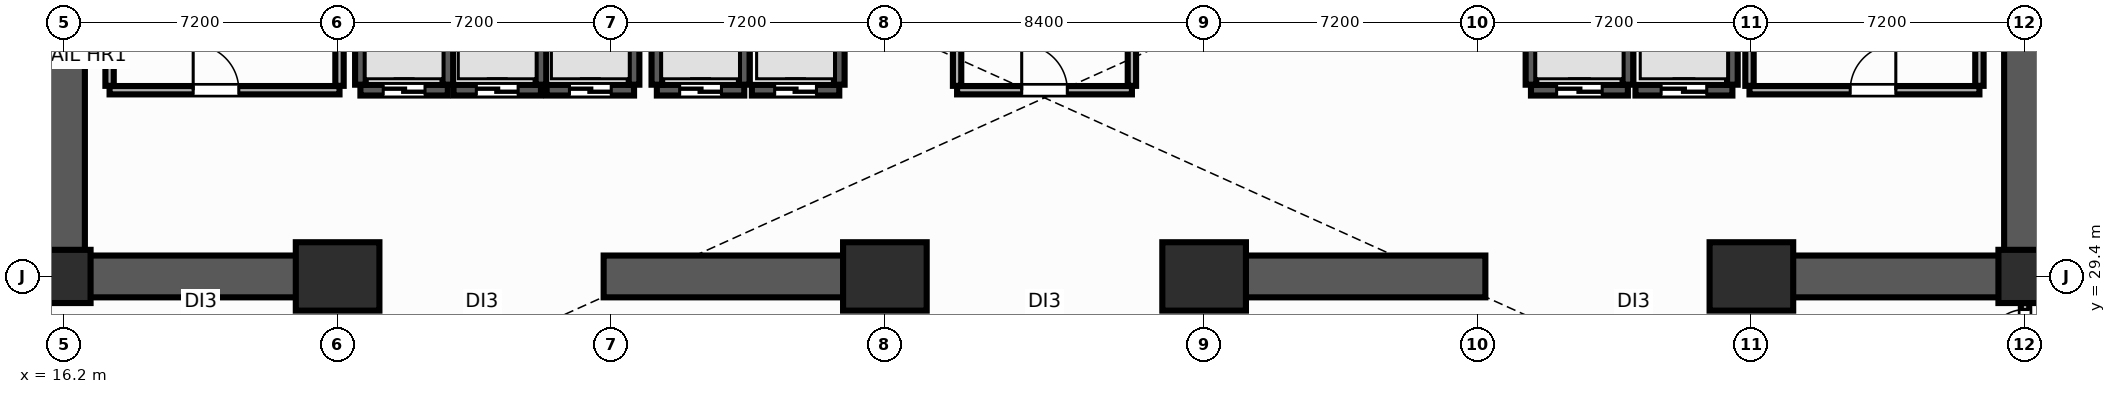
"""IFC4 building model, lengths in metres.
Left out: names, types, materials, properties, quantities, classifications, styles, units other than length and angle.
Written with IfcOpenShell. Run it as: python <this file> out.ifc"""

import sys

from ifc_helpers import new_model, si_unit, direction, frame, frame_2d, origin, origin_2d, place, context, subcontext, project, spatial, rectangle, extrude, element, fill, save


model = new_model("IFC4")
c1 = context("Model", 3, precision=1e-05, world=origin(), true_north=direction((0.0, 1.0)))
c2 = subcontext(c1, "Body", "Model", "MODEL_VIEW")
j1 = project(units=[si_unit("LENGTHUNIT", "METRE"), si_unit("PLANEANGLEUNIT", "RADIAN")], contexts=[c1])
p1 = place(None, origin())
s1 = spatial("IfcSite", under=j1, at=p1, CompositionType="ELEMENT")
p2 = place(p1, origin())
s2 = spatial("IfcBuilding", under=s1, at=p2, CompositionType="ELEMENT")
p3 = place(p2, origin())
s3 = spatial("IfcBuildingStorey", under=s2, at=p3, CompositionType="ELEMENT", Elevation=0.0)
for number, where, z_axis, x_axis in (
    (1, (23.4, 29.4, 0.0), (0.0, 0.0, 1.0), (1.0, 0.0, 0.0)),
    (2, (37.8, 29.4, 0.0), (0.0, 0.0, 1.0), (1.0, 0.0, 0.0)),
    (3, (46.2, 29.4, 0.0), (0.0, 0.0, 1.0), (1.0, 0.0, 0.0)),
    (4, (60.6, 29.4, 0.0), (0.0, 0.0, 1.0), (1.0, 0.0, 0.0)),
):
    element("IfcColumn", number, at=place(p3, frame(where, z_axis=z_axis, x_axis=x_axis)), inside=s3, PredefinedType="USERDEFINED", context=c2, shape_type="SweptSolid", body=[
        extrude(rectangle(XDim=2.2, YDim=1.8, at=origin_2d()), origin(), (0.0, 0.0, 1.0), 7.68),
    ])
for number, where, z_axis, x_axis in (
    (5, (16.2, 29.4, 0.0), (0.0, 0.0, 1.0), (1.0, 0.0, 0.0)),
    (6, (67.8, 29.4, 0.0), (0.0, 0.0, 1.0), (1.0, 0.0, 0.0)),
):
    element("IfcColumn", number, at=place(p3, frame(where, z_axis=z_axis, x_axis=x_axis)), inside=s3, PredefinedType="COLUMN", context=c2, shape_type="SweptSolid", body=[
        extrude(rectangle(XDim=1.4, YDim=1.4, at=origin_2d()), origin(), (0.0, 0.0, 1.0), 7.68),
    ])
for number, where, z_axis, x_axis in (
    (7, (16.2, 29.4, 0.0), (0.0, 0.0, 1.0), (0.0, 1.0, 0.0)),
    (8, (67.8, 29.4, 0.0), (0.0, 0.0, 1.0), (0.0, 1.0, 0.0)),
):
    element("IfcWall", number, at=place(p3, frame(where, z_axis=z_axis, x_axis=x_axis)), inside=s3, PredefinedType="SHEAR", context=c2, shape_type="SweptSolid", body=[
        extrude(rectangle(XDim=19.2, YDim=1.1, at=frame_2d((9.6, 0.0))), origin(), (0.0, 0.0, 1.0), 7.68),
    ])
p4 = place(p3, frame((16.755, 29.4, 0.0), z_axis=(0.0, 0.0, 1.0), x_axis=(1.0, 0.0, 0.0)))
e9 = element("IfcWall", 9, at=p4, inside=s3, PredefinedType="SHEAR", context=c2, shape_type="SweptSolid", body=[
    extrude(rectangle(XDim=6.845, YDim=1.1, at=frame_2d((3.423, 0.0))), origin(), (0.0, 0.0, 1.0), 7.68),
])
for number, where, z_axis, x_axis in (
    (10, (30.4, 29.4, 0.0), (0.0, 0.0, 1.0), (1.0, 0.0, 0.0)),
    (11, (46.0, 29.4, 0.0), (0.0, 0.0, 1.0), (1.0, 0.0, 0.0)),
):
    element("IfcWall", number, at=place(p3, frame(where, z_axis=z_axis, x_axis=x_axis)), inside=s3, PredefinedType="SHEAR", context=c2, shape_type="SweptSolid", body=[
        extrude(rectangle(XDim=7.6, YDim=1.1, at=frame_2d((3.8, 0.0))), origin(), (0.0, 0.0, 1.0), 7.68),
    ])
p5 = place(p3, frame((60.4, 29.4, 0.0), z_axis=(0.0, 0.0, 1.0), x_axis=(1.0, 0.0, 0.0)))
e12 = element("IfcWall", 12, at=p5, inside=s3, PredefinedType="SHEAR", context=c2, shape_type="SweptSolid", body=[
    extrude(rectangle(XDim=6.845, YDim=1.1, at=frame_2d((3.423, 0.0))), origin(), (0.0, 0.0, 1.0), 7.68),
])
p6 = place(p3, frame((24.0, 34.3, 0.0), z_axis=(0.0, 0.0, 1.0), x_axis=(1.0, 0.0, 0.0)))
e13 = element("IfcWall", 13, at=p6, inside=s3, PredefinedType="SHEAR", context=c2, shape_type="SweptSolid", body=[
    extrude(rectangle(XDim=2.3, YDim=0.28, at=frame_2d((1.15, 0.0))), origin(), (0.0, 0.0, 1.0), 7.68),
])
p7 = place(p6, frame((0.6, 0.0, 0.0)))
e14 = element("IfcOpeningElement", 14, at=p7, cuts=e13, PredefinedType="OPENING", context=c2, shape_type="SweptSolid", body=[
    extrude(rectangle(XDim=1.1, YDim=2.2, at=frame_2d((0.55, 1.1))), frame((0.0, 0.15, 0.0), z_axis=(0.0, -1.0, 0.0), x_axis=(1.0, 0.0, 0.0)), (0.0, 0.0, 1.0), 0.3),
])
for number, where, z_axis, x_axis in (
    (15, (24.0, 34.445, 0.0), (0.0, 0.0, 1.0), (0.0, 1.0, 0.0)),
    (16, (26.3, 34.445, 0.0), (0.0, 0.0, 1.0), (0.0, 1.0, 0.0)),
):
    element("IfcWall", number, at=place(p3, frame(where, z_axis=z_axis, x_axis=x_axis)), inside=s3, PredefinedType="SHEAR", context=c2, shape_type="SweptSolid", body=[
        extrude(rectangle(XDim=2.01, YDim=0.28, at=frame_2d((1.005, 0.0))), origin(), (0.0, 0.0, 1.0), 7.68),
    ])
p8 = place(p3, frame((26.45, 34.3, 0.0), z_axis=(0.0, 0.0, 1.0), x_axis=(1.0, 0.0, 0.0)))
e17 = element("IfcWall", 17, at=p8, inside=s3, PredefinedType="SHEAR", context=c2, shape_type="SweptSolid", body=[
    extrude(rectangle(XDim=2.3, YDim=0.28, at=frame_2d((1.15, 0.0))), origin(), (0.0, 0.0, 1.0), 7.68),
])
p9 = place(p8, frame((0.6, 0.0, 0.0)))
e18 = element("IfcOpeningElement", 18, at=p9, cuts=e17, PredefinedType="OPENING", context=c2, shape_type="SweptSolid", body=[
    extrude(rectangle(XDim=1.1, YDim=2.2, at=frame_2d((0.55, 1.1))), frame((0.0, 0.15, 0.0), z_axis=(0.0, -1.0, 0.0), x_axis=(1.0, 0.0, 0.0)), (0.0, 0.0, 1.0), 0.3),
])
p10 = place(p3, frame((28.75, 34.445, 0.0), z_axis=(0.0, 0.0, 1.0), x_axis=(0.0, 1.0, 0.0)))
e19 = element("IfcWall", 19, at=p10, inside=s3, PredefinedType="SHEAR", context=c2, shape_type="SweptSolid", body=[
    extrude(rectangle(XDim=2.01, YDim=0.28, at=frame_2d((1.005, 0.0))), origin(), (0.0, 0.0, 1.0), 7.68),
])
p11 = place(p3, frame((28.9, 34.3, 0.0), z_axis=(0.0, 0.0, 1.0), x_axis=(1.0, 0.0, 0.0)))
e20 = element("IfcWall", 20, at=p11, inside=s3, PredefinedType="SHEAR", context=c2, shape_type="SweptSolid", body=[
    extrude(rectangle(XDim=2.3, YDim=0.28, at=frame_2d((1.15, 0.0))), origin(), (0.0, 0.0, 1.0), 7.68),
])
p12 = place(p11, frame((0.6, 0.0, 0.0)))
e21 = element("IfcOpeningElement", 21, at=p12, cuts=e20, PredefinedType="OPENING", context=c2, shape_type="SweptSolid", body=[
    extrude(rectangle(XDim=1.1, YDim=2.2, at=frame_2d((0.55, 1.1))), frame((0.0, 0.15, 0.0), z_axis=(0.0, -1.0, 0.0), x_axis=(1.0, 0.0, 0.0)), (0.0, 0.0, 1.0), 0.3),
])
p13 = place(p3, frame((31.2, 34.445, 0.0), z_axis=(0.0, 0.0, 1.0), x_axis=(0.0, 1.0, 0.0)))
e22 = element("IfcWall", 22, at=p13, inside=s3, PredefinedType="SHEAR", context=c2, shape_type="SweptSolid", body=[
    extrude(rectangle(XDim=2.01, YDim=0.28, at=frame_2d((1.005, 0.0))), origin(), (0.0, 0.0, 1.0), 7.68),
])
p14 = place(p3, frame((54.8, 34.3, 0.0), z_axis=(0.0, 0.0, 1.0), x_axis=(1.0, 0.0, 0.0)))
e23 = element("IfcWall", 23, at=p14, inside=s3, PredefinedType="SHEAR", context=c2, shape_type="SweptSolid", body=[
    extrude(rectangle(XDim=2.55, YDim=0.28, at=frame_2d((1.275, 0.0))), origin(), (0.0, 0.0, 1.0), 7.68),
])
p15 = place(p14, frame((0.675, 0.0, 0.0)))
e24 = element("IfcOpeningElement", 24, at=p15, cuts=e23, PredefinedType="OPENING", context=c2, shape_type="SweptSolid", body=[
    extrude(rectangle(XDim=1.2, YDim=2.25, at=frame_2d((0.6, 1.125))), frame((0.0, 0.15, 0.0), z_axis=(0.0, -1.0, 0.0), x_axis=(1.0, 0.0, 0.0)), (0.0, 0.0, 1.0), 0.3),
])
for number, where, z_axis, x_axis in (
    (25, (54.8, 34.445, 0.0), (0.0, 0.0, 1.0), (0.0, 1.0, 0.0)),
    (26, (57.35, 34.445, 0.0), (0.0, 0.0, 1.0), (0.0, 1.0, 0.0)),
):
    element("IfcWall", number, at=place(p3, frame(where, z_axis=z_axis, x_axis=x_axis)), inside=s3, PredefinedType="SHEAR", context=c2, shape_type="SweptSolid", body=[
        extrude(rectangle(XDim=2.11, YDim=0.28, at=frame_2d((1.055, 0.0))), origin(), (0.0, 0.0, 1.0), 7.68),
    ])
p16 = place(p3, frame((57.55, 34.3, 0.0), z_axis=(0.0, 0.0, 1.0), x_axis=(1.0, 0.0, 0.0)))
e27 = element("IfcWall", 27, at=p16, inside=s3, PredefinedType="SHEAR", context=c2, shape_type="SweptSolid", body=[
    extrude(rectangle(XDim=2.55, YDim=0.28, at=frame_2d((1.275, 0.0))), origin(), (0.0, 0.0, 1.0), 7.68),
])
p17 = place(p16, frame((0.675, 0.0, 0.0)))
e28 = element("IfcOpeningElement", 28, at=p17, cuts=e27, PredefinedType="OPENING", context=c2, shape_type="SweptSolid", body=[
    extrude(rectangle(XDim=1.2, YDim=2.25, at=frame_2d((0.6, 1.125))), frame((0.0, 0.15, 0.0), z_axis=(0.0, -1.0, 0.0), x_axis=(1.0, 0.0, 0.0)), (0.0, 0.0, 1.0), 0.3),
])
p18 = place(p3, frame((60.1, 34.445, 0.0), z_axis=(0.0, 0.0, 1.0), x_axis=(0.0, 1.0, 0.0)))
e29 = element("IfcWall", 29, at=p18, inside=s3, PredefinedType="SHEAR", context=c2, shape_type="SweptSolid", body=[
    extrude(rectangle(XDim=2.11, YDim=0.28, at=frame_2d((1.055, 0.0))), origin(), (0.0, 0.0, 1.0), 7.68),
])
p19 = place(p3, frame((31.8, 34.3, 0.0), z_axis=(0.0, 0.0, 1.0), x_axis=(1.0, 0.0, 0.0)))
e30 = element("IfcWall", 30, at=p19, inside=s3, PredefinedType="SHEAR", context=c2, shape_type="SweptSolid", body=[
    extrude(rectangle(XDim=2.3, YDim=0.28, at=frame_2d((1.15, 0.0))), origin(), (0.0, 0.0, 1.0), 7.68),
])
p20 = place(p19, frame((0.6, 0.0, 0.0)))
e31 = element("IfcOpeningElement", 31, at=p20, cuts=e30, PredefinedType="OPENING", context=c2, shape_type="SweptSolid", body=[
    extrude(rectangle(XDim=1.1, YDim=2.2, at=frame_2d((0.55, 1.1))), frame((0.0, 0.15, 0.0), z_axis=(0.0, -1.0, 0.0), x_axis=(1.0, 0.0, 0.0)), (0.0, 0.0, 1.0), 0.3),
])
for number, where, z_axis, x_axis in (
    (32, (31.8, 34.445, 0.0), (0.0, 0.0, 1.0), (0.0, 1.0, 0.0)),
    (33, (34.1, 34.445, 0.0), (0.0, 0.0, 1.0), (0.0, 1.0, 0.0)),
):
    element("IfcWall", number, at=place(p3, frame(where, z_axis=z_axis, x_axis=x_axis)), inside=s3, PredefinedType="SHEAR", context=c2, shape_type="SweptSolid", body=[
        extrude(rectangle(XDim=2.01, YDim=0.28, at=frame_2d((1.005, 0.0))), origin(), (0.0, 0.0, 1.0), 7.68),
    ])
p21 = place(p3, frame((34.3, 34.3, 0.0), z_axis=(0.0, 0.0, 1.0), x_axis=(1.0, 0.0, 0.0)))
e34 = element("IfcWall", 34, at=p21, inside=s3, PredefinedType="SHEAR", context=c2, shape_type="SweptSolid", body=[
    extrude(rectangle(XDim=2.3, YDim=0.28, at=frame_2d((1.15, 0.0))), origin(), (0.0, 0.0, 1.0), 7.68),
])
p22 = place(p21, frame((0.6, 0.0, 0.0)))
e35 = element("IfcOpeningElement", 35, at=p22, cuts=e34, PredefinedType="OPENING", context=c2, shape_type="SweptSolid", body=[
    extrude(rectangle(XDim=1.1, YDim=2.2, at=frame_2d((0.55, 1.1))), frame((0.0, 0.15, 0.0), z_axis=(0.0, -1.0, 0.0), x_axis=(1.0, 0.0, 0.0)), (0.0, 0.0, 1.0), 0.3),
])
p23 = place(p3, frame((36.6, 34.445, 0.0), z_axis=(0.0, 0.0, 1.0), x_axis=(0.0, 1.0, 0.0)))
e36 = element("IfcWall", 36, at=p23, inside=s3, PredefinedType="SHEAR", context=c2, shape_type="SweptSolid", body=[
    extrude(rectangle(XDim=2.01, YDim=0.28, at=frame_2d((1.005, 0.0))), origin(), (0.0, 0.0, 1.0), 7.68),
])
p24 = place(p3, frame((17.4, 34.3, 0.0), z_axis=(0.0, 0.0, 1.0), x_axis=(1.0, 0.0, 0.0)))
e37 = element("IfcWall", 37, at=p24, inside=s3, PredefinedType="PARTITIONING", context=c2, shape_type="SweptSolid", body=[
    extrude(rectangle(XDim=6.05, YDim=0.22, at=frame_2d((3.025, 0.0))), origin(), (0.0, 0.0, 1.0), 7.68),
])
p25 = place(p24, frame((2.2, 0.0, 0.0)))
e38 = element("IfcOpeningElement", 38, at=p25, cuts=e37, PredefinedType="OPENING", context=c2, shape_type="SweptSolid", body=[
    extrude(rectangle(XDim=1.2, YDim=2.15, at=frame_2d((0.6, 1.075))), frame((0.0, 0.12, 0.0), z_axis=(0.0, -1.0, 0.0), x_axis=(1.0, 0.0, 0.0)), (0.0, 0.0, 1.0), 0.24),
])
p26 = place(p3, frame((17.4, 34.415, 0.0), z_axis=(0.0, 0.0, 1.0), x_axis=(0.0, 1.0, 0.0)))
e39 = element("IfcWall", 39, at=p26, inside=s3, PredefinedType="PARTITIONING", context=c2, shape_type="SweptSolid", body=[
    extrude(rectangle(XDim=5.43, YDim=0.22, at=frame_2d((2.715, 0.0))), origin(), (0.0, 0.0, 1.0), 7.68),
])
p27 = place(p3, frame((23.45, 34.415, 0.0), z_axis=(0.0, 0.0, 1.0), x_axis=(0.0, 1.0, 0.0)))
e40 = element("IfcWall", 40, at=p27, inside=s3, PredefinedType="PARTITIONING", context=c2, shape_type="SweptSolid", body=[
    extrude(rectangle(XDim=5.64, YDim=0.22, at=frame_2d((2.82, 0.0))), origin(), (0.0, 0.0, 1.0), 7.68),
])
p28 = place(p27, frame((3.385, 0.0, 0.0)))
e41 = element("IfcOpeningElement", 41, at=p28, cuts=e40, PredefinedType="OPENING", context=c2, shape_type="SweptSolid", body=[
    extrude(rectangle(XDim=1.2, YDim=2.15, at=frame_2d((0.6, 1.075))), frame((0.0, 0.12, 0.0), z_axis=(0.0, -1.0, 0.0), x_axis=(1.0, 0.0, 0.0)), (0.0, 0.0, 1.0), 0.24),
])
p29 = place(p3, frame((60.55, 34.3, 0.0), z_axis=(0.0, 0.0, 1.0), x_axis=(1.0, 0.0, 0.0)))
e42 = element("IfcWall", 42, at=p29, inside=s3, PredefinedType="PARTITIONING", context=c2, shape_type="SweptSolid", body=[
    extrude(rectangle(XDim=6.05, YDim=0.22, at=frame_2d((3.025, 0.0))), origin(), (0.0, 0.0, 1.0), 7.68),
])
p30 = place(p29, frame((2.65, 0.0, 0.0)))
e43 = element("IfcOpeningElement", 43, at=p30, cuts=e42, PredefinedType="OPENING", context=c2, shape_type="SweptSolid", body=[
    extrude(rectangle(XDim=1.2, YDim=2.15, at=frame_2d((0.6, 1.075))), frame((0.0, 0.12, 0.0), z_axis=(0.0, -1.0, 0.0), x_axis=(1.0, 0.0, 0.0)), (0.0, 0.0, 1.0), 0.24),
])
p31 = place(p3, frame((60.55, 34.415, 0.0), z_axis=(0.0, 0.0, 1.0), x_axis=(0.0, 1.0, 0.0)))
e44 = element("IfcWall", 44, at=p31, inside=s3, PredefinedType="PARTITIONING", context=c2, shape_type="SweptSolid", body=[
    extrude(rectangle(XDim=5.64, YDim=0.22, at=frame_2d((2.82, 0.0))), origin(), (0.0, 0.0, 1.0), 7.68),
])
p32 = place(p31, frame((3.435, 0.0, 0.0)))
e45 = element("IfcOpeningElement", 45, at=p32, cuts=e44, PredefinedType="OPENING", context=c2, shape_type="SweptSolid", body=[
    extrude(rectangle(XDim=1.2, YDim=2.15, at=frame_2d((0.6, 1.075))), frame((0.0, 0.12, 0.0), z_axis=(0.0, -1.0, 0.0), x_axis=(1.0, 0.0, 0.0)), (0.0, 0.0, 1.0), 0.24),
])
p33 = place(p3, frame((66.6, 34.415, 0.0), z_axis=(0.0, 0.0, 1.0), x_axis=(0.0, 1.0, 0.0)))
e46 = element("IfcWall", 46, at=p33, inside=s3, PredefinedType="PARTITIONING", context=c2, shape_type="SweptSolid", body=[
    extrude(rectangle(XDim=5.43, YDim=0.22, at=frame_2d((2.715, 0.0))), origin(), (0.0, 0.0, 1.0), 7.68),
])
p34 = place(p3, frame((39.7, 34.3, 0.0), z_axis=(0.0, 0.0, 1.0), x_axis=(1.0, 0.0, 0.0)))
e47 = element("IfcWall", 47, at=p34, inside=s3, PredefinedType="PARTITIONING", context=c2, shape_type="SweptSolid", body=[
    extrude(rectangle(XDim=4.6, YDim=0.22, at=frame_2d((2.3, 0.0))), origin(), (0.0, 0.0, 1.0), 7.68),
])
p35 = place(p34, frame((1.7, 0.0, 0.0)))
e48 = element("IfcOpeningElement", 48, at=p35, cuts=e47, PredefinedType="OPENING", context=c2, shape_type="SweptSolid", body=[
    extrude(rectangle(XDim=1.2, YDim=2.15, at=frame_2d((0.6, 1.075))), frame((0.0, 0.12, 0.0), z_axis=(0.0, -1.0, 0.0), x_axis=(1.0, 0.0, 0.0)), (0.0, 0.0, 1.0), 0.24),
])
p36 = place(p3, frame((39.7, 34.415, 0.0), z_axis=(0.0, 0.0, 1.0), x_axis=(0.0, 1.0, 0.0)))
e49 = element("IfcWall", 49, at=p36, inside=s3, PredefinedType="PARTITIONING", context=c2, shape_type="SweptSolid", body=[
    extrude(rectangle(XDim=5.785, YDim=0.22, at=frame_2d((2.893, 0.0))), origin(), (0.0, 0.0, 1.0), 7.68),
])
p37 = place(p36, frame((3.385, 0.0, 0.0)))
e50 = element("IfcOpeningElement", 50, at=p37, cuts=e49, PredefinedType="OPENING", context=c2, shape_type="SweptSolid", body=[
    extrude(rectangle(XDim=1.2, YDim=2.15, at=frame_2d((0.6, 1.075))), frame((0.0, 0.12, 0.0), z_axis=(0.0, -1.0, 0.0), x_axis=(1.0, 0.0, 0.0)), (0.0, 0.0, 1.0), 0.24),
])
p38 = place(p3, frame((44.3, 34.415, 0.0), z_axis=(0.0, 0.0, 1.0), x_axis=(0.0, 1.0, 0.0)))
e51 = element("IfcWall", 51, at=p38, inside=s3, PredefinedType="PARTITIONING", context=c2, shape_type="SweptSolid", body=[
    extrude(rectangle(XDim=5.785, YDim=0.22, at=frame_2d((2.893, 0.0))), origin(), (0.0, 0.0, 1.0), 7.68),
])
p39 = place(p3, frame((67.8, 26.88, 0.0), z_axis=(0.0, 0.0, 1.0), x_axis=(0.0, 1.0, 0.0)))
e52 = element("IfcWall", 52, at=p39, inside=s3, PredefinedType="PARTITIONING", context=c2, shape_type="SweptSolid", body=[
    extrude(rectangle(XDim=2.51, YDim=0.22, at=frame_2d((1.255, 0.0))), origin(), (0.0, 0.0, 1.0), 7.68),
])
p40 = place(p39, frame((0.65, 0.0, 0.0)))
e53 = element("IfcOpeningElement", 53, at=p40, cuts=e52, PredefinedType="OPENING", context=c2, shape_type="SweptSolid", body=[
    extrude(rectangle(XDim=1.0, YDim=2.15, at=frame_2d((0.5, 1.075))), frame((0.0, 0.12, 0.0), z_axis=(0.0, -1.0, 0.0), x_axis=(1.0, 0.0, 0.0)), (0.0, 0.0, 1.0), 0.24),
])
p41 = place(p7, origin())
e54 = element("IfcDoor", 54, at=p41, inside=s3, OperationType="DOUBLE_DOOR_SLIDING", PredefinedType="DOOR", context=c2, shape_type="SweptSolid", body=[
    extrude(rectangle(XDim=1.1, YDim=2.2, at=frame_2d((0.55, 1.1))), frame((0.0, 0.025, 0.0), z_axis=(0.0, -1.0, 0.0), x_axis=(1.0, 0.0, 0.0)), (0.0, 0.0, 1.0), 0.05),
])
fill(e14, e54)
p42 = place(p9, origin())
e55 = element("IfcDoor", 55, at=p42, inside=s3, OperationType="DOUBLE_DOOR_SLIDING", PredefinedType="DOOR", context=c2, shape_type="SweptSolid", body=[
    extrude(rectangle(XDim=1.1, YDim=2.2, at=frame_2d((0.55, 1.1))), frame((0.0, 0.025, 0.0), z_axis=(0.0, -1.0, 0.0), x_axis=(1.0, 0.0, 0.0)), (0.0, 0.0, 1.0), 0.05),
])
fill(e18, e55)
p43 = place(p12, origin())
e56 = element("IfcDoor", 56, at=p43, inside=s3, OperationType="DOUBLE_DOOR_SLIDING", PredefinedType="DOOR", context=c2, shape_type="SweptSolid", body=[
    extrude(rectangle(XDim=1.1, YDim=2.2, at=frame_2d((0.55, 1.1))), frame((0.0, 0.025, 0.0), z_axis=(0.0, -1.0, 0.0), x_axis=(1.0, 0.0, 0.0)), (0.0, 0.0, 1.0), 0.05),
])
fill(e21, e56)
p44 = place(p15, origin())
e57 = element("IfcDoor", 57, at=p44, inside=s3, OperationType="DOUBLE_DOOR_SLIDING", PredefinedType="DOOR", context=c2, shape_type="SweptSolid", body=[
    extrude(rectangle(XDim=1.2, YDim=2.25, at=frame_2d((0.6, 1.125))), frame((0.0, 0.025, 0.0), z_axis=(0.0, -1.0, 0.0), x_axis=(1.0, 0.0, 0.0)), (0.0, 0.0, 1.0), 0.05),
])
fill(e24, e57)
p45 = place(p17, origin())
e58 = element("IfcDoor", 58, at=p45, inside=s3, OperationType="DOUBLE_DOOR_SLIDING", PredefinedType="DOOR", context=c2, shape_type="SweptSolid", body=[
    extrude(rectangle(XDim=1.2, YDim=2.25, at=frame_2d((0.6, 1.125))), frame((0.0, 0.025, 0.0), z_axis=(0.0, -1.0, 0.0), x_axis=(1.0, 0.0, 0.0)), (0.0, 0.0, 1.0), 0.05),
])
fill(e28, e58)
p46 = place(p20, origin())
e59 = element("IfcDoor", 59, at=p46, inside=s3, OperationType="DOUBLE_DOOR_SLIDING", PredefinedType="DOOR", context=c2, shape_type="SweptSolid", body=[
    extrude(rectangle(XDim=1.1, YDim=2.2, at=frame_2d((0.55, 1.1))), frame((0.0, 0.025, 0.0), z_axis=(0.0, -1.0, 0.0), x_axis=(1.0, 0.0, 0.0)), (0.0, 0.0, 1.0), 0.05),
])
fill(e31, e59)
p47 = place(p22, origin())
e60 = element("IfcDoor", 60, at=p47, inside=s3, OperationType="DOUBLE_DOOR_SLIDING", PredefinedType="DOOR", context=c2, shape_type="SweptSolid", body=[
    extrude(rectangle(XDim=1.1, YDim=2.2, at=frame_2d((0.55, 1.1))), frame((0.0, 0.025, 0.0), z_axis=(0.0, -1.0, 0.0), x_axis=(1.0, 0.0, 0.0)), (0.0, 0.0, 1.0), 0.05),
])
fill(e35, e60)
p48 = place(p25, origin())
e61 = element("IfcDoor", 61, at=p48, inside=s3, OperationType="SINGLE_SWING_LEFT", PredefinedType="DOOR", context=c2, shape_type="SweptSolid", body=[
    extrude(rectangle(XDim=1.2, YDim=2.15, at=frame_2d((0.6, 1.075))), frame((0.0, 0.025, 0.0), z_axis=(0.0, -1.0, 0.0), x_axis=(1.0, 0.0, 0.0)), (0.0, 0.0, 1.0), 0.05),
])
fill(e38, e61)
p49 = place(p30, origin())
e62 = element("IfcDoor", 62, at=p49, inside=s3, OperationType="SINGLE_SWING_RIGHT", PredefinedType="DOOR", context=c2, shape_type="SweptSolid", body=[
    extrude(rectangle(XDim=1.2, YDim=2.15, at=frame_2d((0.6, 1.075))), frame((0.0, 0.025, 0.0), z_axis=(0.0, -1.0, 0.0), x_axis=(1.0, 0.0, 0.0)), (0.0, 0.0, 1.0), 0.05),
])
fill(e43, e62)
p50 = place(p35, origin())
e63 = element("IfcDoor", 63, at=p50, inside=s3, OperationType="SINGLE_SWING_LEFT", PredefinedType="DOOR", context=c2, shape_type="SweptSolid", body=[
    extrude(rectangle(XDim=1.2, YDim=2.15, at=frame_2d((0.6, 1.075))), frame((0.0, 0.025, 0.0), z_axis=(0.0, -1.0, 0.0), x_axis=(1.0, 0.0, 0.0)), (0.0, 0.0, 1.0), 0.05),
])
fill(e48, e63)
p51 = place(p40, origin())
e64 = element("IfcDoor", 64, at=p51, inside=s3, OperationType="SINGLE_SWING_LEFT", PredefinedType="DOOR", context=c2, shape_type="SweptSolid", body=[
    extrude(rectangle(XDim=1.0, YDim=2.15, at=frame_2d((0.5, 1.075))), frame((0.0, 0.025, 0.0), z_axis=(0.0, -1.0, 0.0), x_axis=(1.0, 0.0, 0.0)), (0.0, 0.0, 1.0), 0.05),
])
fill(e53, e64)
save(model, sys.argv[1])
